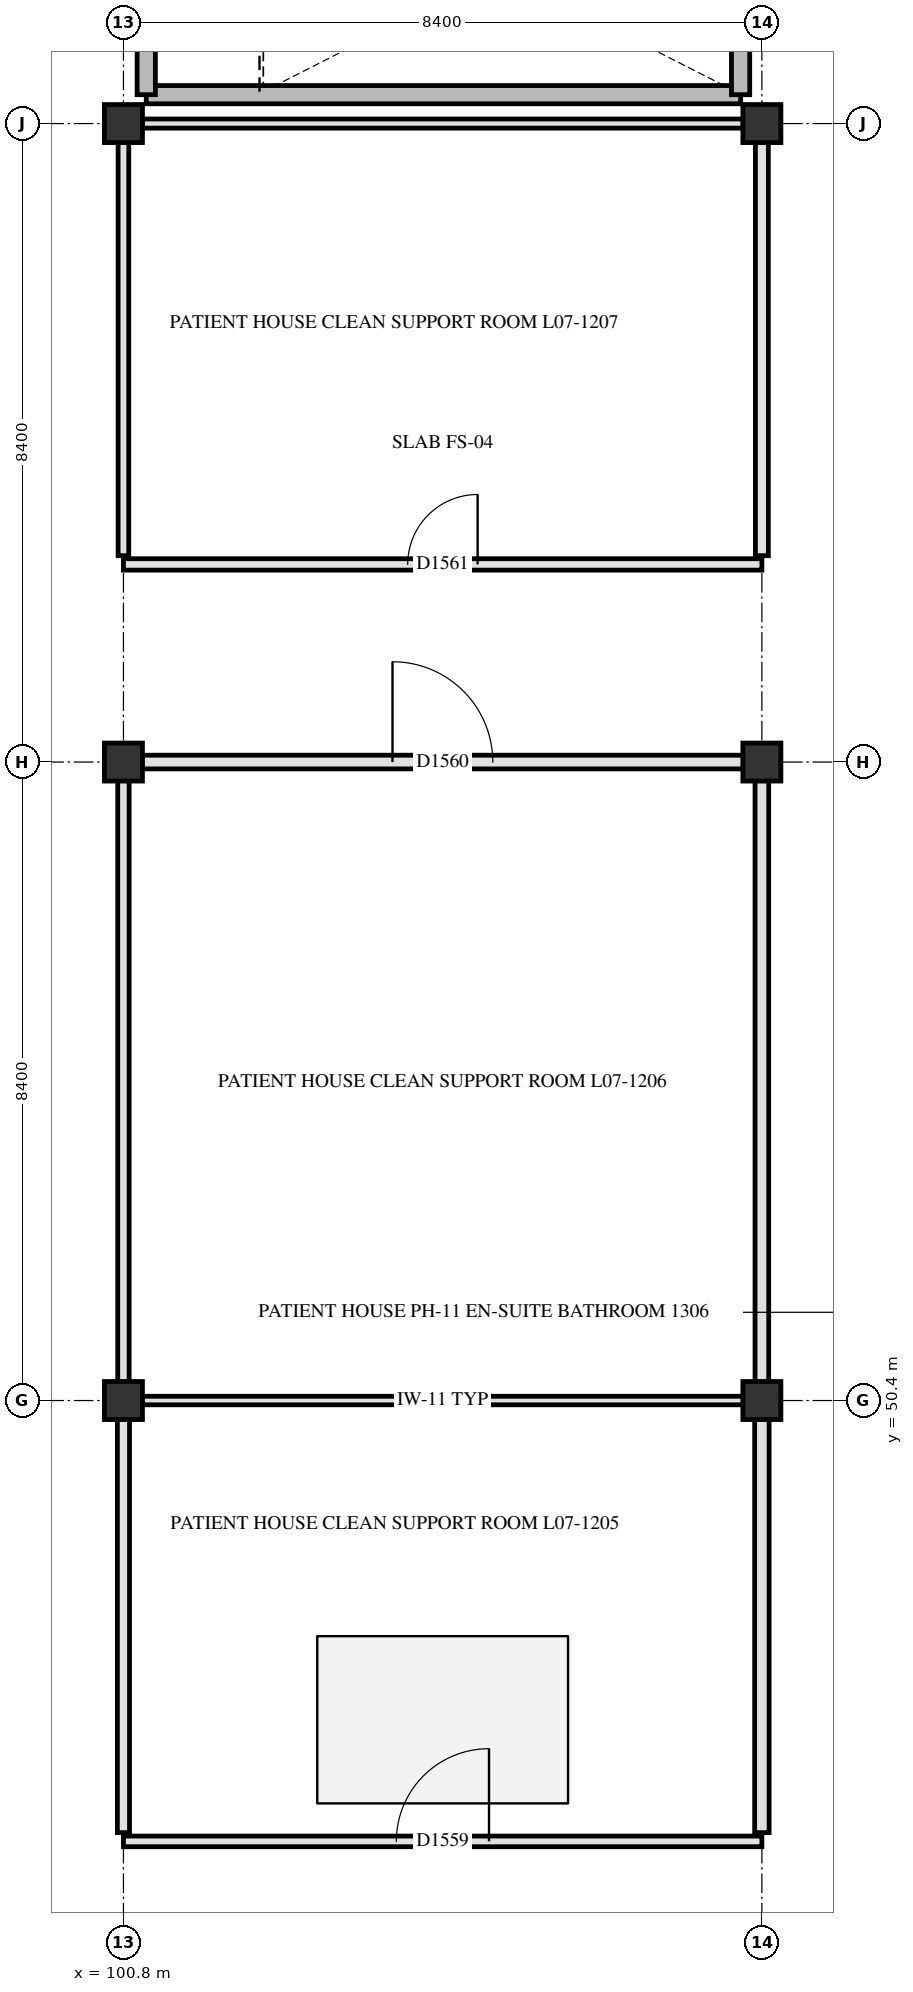
"""IFC4 building model, lengths in metres.
Left out: names, types, materials, properties, quantities, classifications, styles, units other than length and angle.
Written with IfcOpenShell. Run it as: python <this file> out.ifc"""

import sys

from ifc_helpers import new_model, si_unit, direction, frame, frame_2d, origin, origin_2d, place, context, subcontext, project, spatial, rectangle, extrude, element, fill, save


model = new_model("IFC4")
c1 = context("Model", 3, precision=1e-05, world=origin(), true_north=direction((0.0, 1.0)))
c2 = subcontext(c1, "Body", "Model", "MODEL_VIEW")
j1 = project(units=[si_unit("LENGTHUNIT", "METRE"), si_unit("PLANEANGLEUNIT", "RADIAN")], contexts=[c1])
p1 = place(None, origin())
s1 = spatial("IfcSite", under=j1, at=p1, CompositionType="ELEMENT")
p2 = place(p1, origin())
s2 = spatial("IfcBuilding", under=s1, at=p2, CompositionType="ELEMENT")
p3 = place(p2, frame((0.0, 0.0, 30.3)))
s3 = spatial("IfcBuildingStorey", under=s2, at=p3, CompositionType="ELEMENT", Elevation=30.3)
for number, where, z_axis, x_axis in (
    (1, (100.8, 50.4, 0.0), (0.0, 0.0, 1.0), (1.0, 0.0, 0.0)),
    (2, (100.8, 58.8, 0.0), (0.0, 0.0, 1.0), (1.0, 0.0, 0.0)),
    (3, (100.8, 67.2, 0.0), (0.0, 0.0, 1.0), (1.0, 0.0, 0.0)),
    (4, (109.2, 50.4, 0.0), (0.0, 0.0, 1.0), (1.0, 0.0, 0.0)),
    (5, (109.2, 58.8, 0.0), (0.0, 0.0, 1.0), (1.0, 0.0, 0.0)),
    (6, (109.2, 67.2, 0.0), (0.0, 0.0, 1.0), (1.0, 0.0, 0.0)),
):
    element("IfcColumn", number, at=place(p3, frame(where, z_axis=z_axis, x_axis=x_axis)), inside=s3, PredefinedType="COLUMN", context=c2, shape_type="SweptSolid", body=[
        extrude(rectangle(XDim=0.5, YDim=0.5, at=origin_2d()), origin(), (0.0, 0.0, 1.0), 3.9),
    ])
p4 = place(p3, frame((101.1, 67.58, 0.0), z_axis=(0.0, 0.0, 1.0), x_axis=(1.0, 0.0, 0.0)))
e7 = element("IfcWall", 7, at=p4, inside=s3, PredefinedType="SHEAR", context=c2, shape_type="SweptSolid", body=[
    extrude(rectangle(XDim=7.82, YDim=0.24, at=frame_2d((3.91, 0.0))), origin(), (0.0, 0.0, 1.0), 3.66),
])
for number, where, z_axis, x_axis in (
    (8, (101.1, 67.58, 0.0), (0.0, 0.0, 1.0), (0.0, 1.0, 0.0)),
    (9, (108.92, 67.58, 0.0), (0.0, 0.0, 1.0), (0.0, 1.0, 0.0)),
):
    element("IfcWall", number, at=place(p3, frame(where, z_axis=z_axis, x_axis=x_axis)), inside=s3, PredefinedType="SHEAR", context=c2, shape_type="SweptSolid", body=[
        extrude(rectangle(XDim=3.32, YDim=0.24, at=frame_2d((1.66, 0.0))), origin(), (0.0, 0.0, 1.0), 3.66),
    ])
p5 = place(p3, frame((100.8, 44.6, 0.0), z_axis=(0.0, 0.0, 1.0), x_axis=(1.0, 0.0, 0.0)))
e10 = element("IfcWall", 10, at=p5, inside=s3, PredefinedType="PARTITIONING", context=c2, shape_type="SweptSolid", body=[
    extrude(rectangle(XDim=8.4, YDim=0.14, at=frame_2d((4.2, 0.0))), origin(), (0.0, 0.0, 1.0), 3.25),
])
p6 = place(p5, frame((3.59, 0.0, 0.0)))
e11 = element("IfcOpeningElement", 11, at=p6, cuts=e10, PredefinedType="OPENING", context=c2, shape_type="SweptSolid", body=[
    extrude(rectangle(XDim=1.22, YDim=2.18, at=frame_2d((0.61, 1.09))), frame((0.0, 0.08, 0.0), z_axis=(0.0, -1.0, 0.0), x_axis=(1.0, 0.0, 0.0)), (0.0, 0.0, 1.0), 0.16),
])
p7 = place(p3, frame((101.045, 50.4, 0.0), z_axis=(0.0, 0.0, 1.0), x_axis=(1.0, 0.0, 0.0)))
e12 = element("IfcWall", 12, at=p7, inside=s3, PredefinedType="PARTITIONING", context=c2, shape_type="SweptSolid", body=[
    extrude(rectangle(XDim=7.91, YDim=0.112, at=frame_2d((3.955, 0.0))), origin(), (0.0, 0.0, 1.0), 3.25),
])
p8 = place(p3, frame((101.045, 58.8, 0.0), z_axis=(0.0, 0.0, 1.0), x_axis=(1.0, 0.0, 0.0)))
e13 = element("IfcWall", 13, at=p8, inside=s3, PredefinedType="PARTITIONING", context=c2, shape_type="SweptSolid", body=[
    extrude(rectangle(XDim=7.91, YDim=0.18, at=frame_2d((3.955, 0.0))), origin(), (0.0, 0.0, 1.0), 3.25),
])
p9 = place(p8, frame((3.295, 0.0, 0.0)))
e14 = element("IfcOpeningElement", 14, at=p9, cuts=e13, PredefinedType="OPENING", context=c2, shape_type="SweptSolid", body=[
    extrude(rectangle(XDim=1.32, YDim=2.18, at=frame_2d((0.66, 1.09))), frame((0.0, 0.1, 0.0), z_axis=(0.0, -1.0, 0.0), x_axis=(1.0, 0.0, 0.0)), (0.0, 0.0, 1.0), 0.2),
])
p10 = place(p3, frame((100.8, 61.4, 0.0), z_axis=(0.0, 0.0, 1.0), x_axis=(1.0, 0.0, 0.0)))
e15 = element("IfcWall", 15, at=p10, inside=s3, PredefinedType="PARTITIONING", context=c2, shape_type="SweptSolid", body=[
    extrude(rectangle(XDim=8.4, YDim=0.15, at=frame_2d((4.2, 0.0))), origin(), (0.0, 0.0, 1.0), 3.25),
])
p11 = place(p10, frame((3.74, 0.0, 0.0)))
e16 = element("IfcOpeningElement", 16, at=p11, cuts=e15, PredefinedType="OPENING", context=c2, shape_type="SweptSolid", body=[
    extrude(rectangle(XDim=0.92, YDim=2.08, at=frame_2d((0.46, 1.04))), frame((0.0, 0.085, 0.0), z_axis=(0.0, -1.0, 0.0), x_axis=(1.0, 0.0, 0.0)), (0.0, 0.0, 1.0), 0.17),
])
p12 = place(p3, frame((101.045, 67.2, 0.0), z_axis=(0.0, 0.0, 1.0), x_axis=(1.0, 0.0, 0.0)))
e17 = element("IfcWall", 17, at=p12, inside=s3, PredefinedType="PARTITIONING", context=c2, shape_type="SweptSolid", body=[
    extrude(rectangle(XDim=7.91, YDim=0.12, at=frame_2d((3.955, 0.0))), origin(), (0.0, 0.0, 1.0), 3.25),
])
p13 = place(p3, frame((100.8, 44.715, 0.0), z_axis=(0.0, 0.0, 1.0), x_axis=(0.0, 1.0, 0.0)))
e18 = element("IfcWall", 18, at=p13, inside=s3, PredefinedType="PARTITIONING", context=c2, shape_type="SweptSolid", body=[
    extrude(rectangle(XDim=5.44, YDim=0.16, at=frame_2d((2.72, 0.0))), origin(), (0.0, 0.0, 1.0), 3.25),
])
p14 = place(p3, frame((100.8, 50.645, 0.0), z_axis=(0.0, 0.0, 1.0), x_axis=(0.0, 1.0, 0.0)))
e19 = element("IfcWall", 19, at=p14, inside=s3, PredefinedType="PARTITIONING", context=c2, shape_type="SweptSolid", body=[
    extrude(rectangle(XDim=7.91, YDim=0.15, at=frame_2d((3.955, 0.0))), origin(), (0.0, 0.0, 1.0), 3.25),
])
p15 = place(p3, frame((100.8, 61.515, 0.0), z_axis=(0.0, 0.0, 1.0), x_axis=(0.0, 1.0, 0.0)))
e20 = element("IfcWall", 20, at=p15, inside=s3, PredefinedType="PARTITIONING", context=c2, shape_type="SweptSolid", body=[
    extrude(rectangle(XDim=5.44, YDim=0.14, at=frame_2d((2.72, 0.0))), origin(), (0.0, 0.0, 1.0), 3.25),
])
p16 = place(p3, frame((109.2, 44.715, 0.0), z_axis=(0.0, 0.0, 1.0), x_axis=(0.0, 1.0, 0.0)))
e21 = element("IfcWall", 21, at=p16, inside=s3, PredefinedType="PARTITIONING", context=c2, shape_type="SweptSolid", body=[
    extrude(rectangle(XDim=5.44, YDim=0.19, at=frame_2d((2.72, 0.0))), origin(), (0.0, 0.0, 1.0), 3.25),
])
p17 = place(p3, frame((109.2, 50.645, 0.0), z_axis=(0.0, 0.0, 1.0), x_axis=(0.0, 1.0, 0.0)))
e22 = element("IfcWall", 22, at=p17, inside=s3, PredefinedType="PARTITIONING", context=c2, shape_type="SweptSolid", body=[
    extrude(rectangle(XDim=7.91, YDim=0.18, at=frame_2d((3.955, 0.0))), origin(), (0.0, 0.0, 1.0), 3.25),
])
p18 = place(p3, frame((109.2, 61.515, 0.0), z_axis=(0.0, 0.0, 1.0), x_axis=(0.0, 1.0, 0.0)))
e23 = element("IfcWall", 23, at=p18, inside=s3, PredefinedType="PARTITIONING", context=c2, shape_type="SweptSolid", body=[
    extrude(rectangle(XDim=5.44, YDim=0.17, at=frame_2d((2.72, 0.0))), origin(), (0.0, 0.0, 1.0), 3.25),
])
p19 = place(p6, origin())
e24 = element("IfcDoor", 24, at=p19, inside=s3, OperationType="SINGLE_SWING_RIGHT", PredefinedType="DOOR", context=c2, shape_type="SweptSolid", body=[
    extrude(rectangle(XDim=1.22, YDim=2.18, at=frame_2d((0.61, 1.09))), frame((0.0, 0.025, 0.0), z_axis=(0.0, -1.0, 0.0), x_axis=(1.0, 0.0, 0.0)), (0.0, 0.0, 1.0), 0.05),
])
fill(e11, e24)
p20 = place(p9, origin())
e25 = element("IfcDoor", 25, at=p20, inside=s3, OperationType="SINGLE_SWING_LEFT", PredefinedType="DOOR", context=c2, shape_type="SweptSolid", body=[
    extrude(rectangle(XDim=1.32, YDim=2.18, at=frame_2d((0.66, 1.09))), frame((0.0, 0.025, 0.0), z_axis=(0.0, -1.0, 0.0), x_axis=(1.0, 0.0, 0.0)), (0.0, 0.0, 1.0), 0.05),
])
fill(e14, e25)
p21 = place(p11, origin())
e26 = element("IfcDoor", 26, at=p21, inside=s3, OperationType="SINGLE_SWING_RIGHT", PredefinedType="DOOR", context=c2, shape_type="SweptSolid", body=[
    extrude(rectangle(XDim=0.92, YDim=2.08, at=frame_2d((0.46, 1.04))), frame((0.0, 0.025, 0.0), z_axis=(0.0, -1.0, 0.0), x_axis=(1.0, 0.0, 0.0)), (0.0, 0.0, 1.0), 0.05),
])
fill(e16, e26)
save(model, sys.argv[1])
